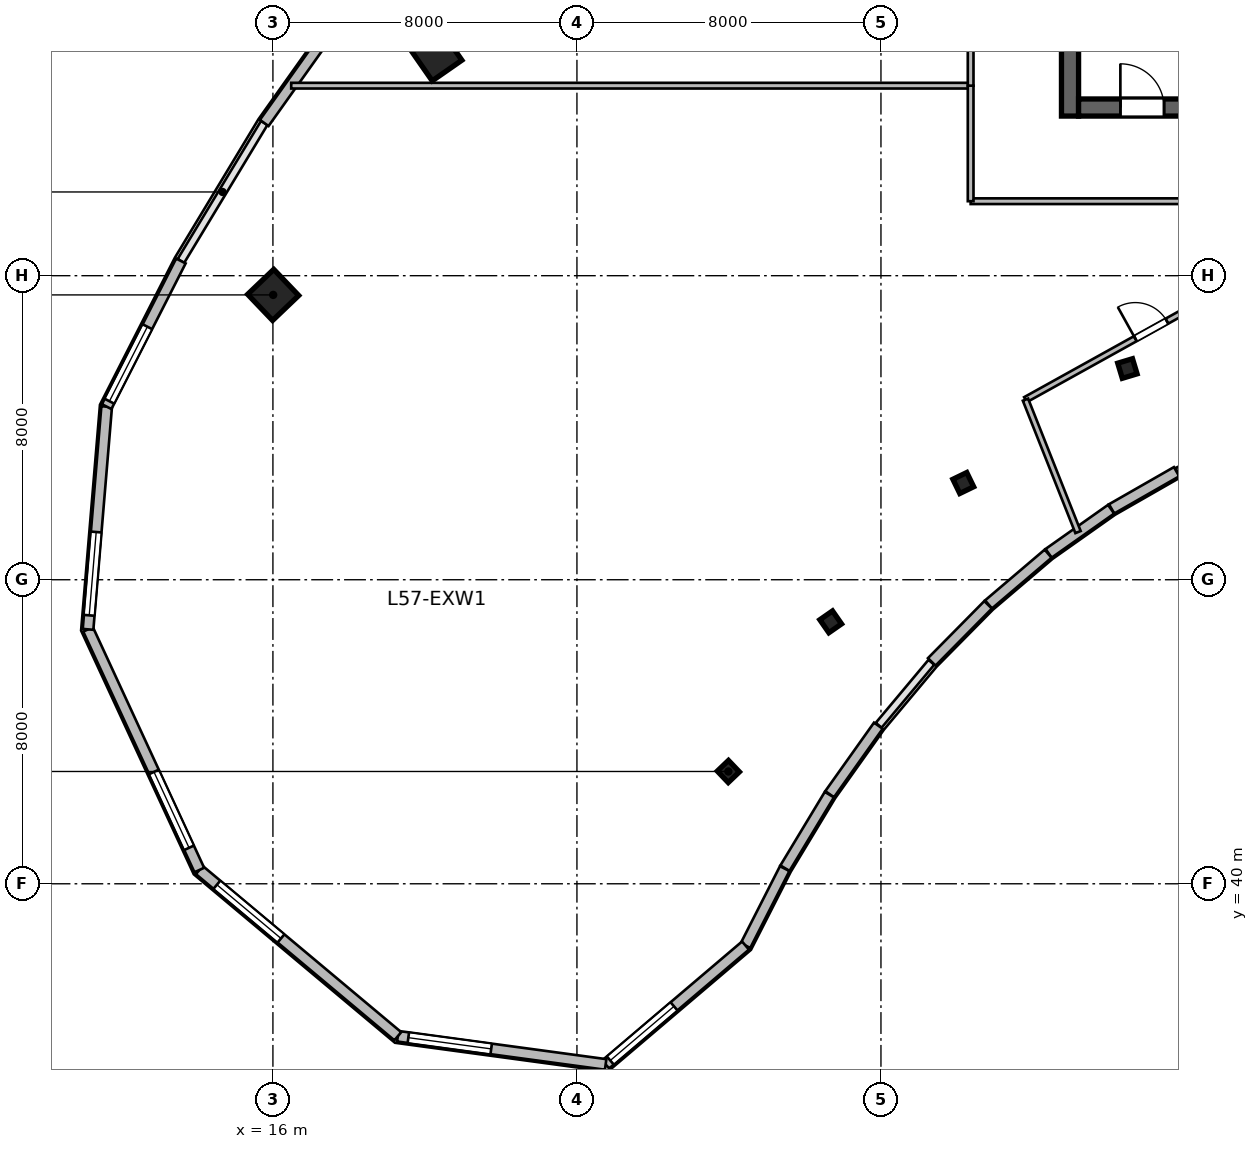
"""IFC4 building model, lengths in metres.
Left out: names, types, materials, properties, quantities, classifications, styles, units other than length and angle.
Written with IfcOpenShell. Run it as: python <this file> out.ifc"""

import sys

from ifc_helpers import new_model, si_unit, direction, frame, frame_2d, origin, origin_2d, place, context, subcontext, project, spatial, rectangle, i_section, extrude, source, transform, mapped, element, fill, save


model = new_model("IFC4")
c1 = context("Model", 3, precision=1e-05, world=origin(), true_north=direction((0.0, 1.0)))
c2 = subcontext(c1, "Body", "Model", "MODEL_VIEW")
j1 = project(units=[si_unit("LENGTHUNIT", "METRE"), si_unit("PLANEANGLEUNIT", "RADIAN")], contexts=[c1])
p1 = place(None, origin())
s1 = spatial("IfcSite", under=j1, at=p1, CompositionType="ELEMENT")
p2 = place(p1, origin())
s2 = spatial("IfcBuilding", under=s1, at=p2, CompositionType="ELEMENT")
p3 = place(p2, frame((0.0, 0.0, 235.2)))
s3 = spatial("IfcBuildingStorey", under=s2, at=p3, CompositionType="ELEMENT", Elevation=235.2)
m1 = source(origin(), c2, "Body", "SweptSolid", [
    extrude(rectangle(XDim=12.0, YDim=0.45, at=frame_2d((6.0, 0.0))), origin(), (0.0, 0.0, 1.0), 3.9),
])
p4 = place(p3, frame((36.975, 60.2, 0.0), z_axis=(0.0, 0.0, 1.0), x_axis=(0.0, 1.0, 0.0)))
e1 = element("IfcWall", 1, at=p4, inside=s3, PredefinedType="SHEAR", context=c2, shape_type="MappedRepresentation", body=[
    mapped(m1, transform((0.0, 0.0, 0.0), scale=1.0)),
])
m2 = source(origin(), c2, "Body", "SweptSolid", [
    extrude(rectangle(XDim=21.6, YDim=0.45, at=frame_2d((10.8, 0.0))), origin(), (0.0, 0.0, 1.0), 3.9),
])
p5 = place(p3, frame((37.2, 60.425, 0.0), z_axis=(0.0, 0.0, 1.0), x_axis=(1.0, 0.0, 0.0)))
e2 = element("IfcWall", 2, at=p5, inside=s3, PredefinedType="SHEAR", context=c2, shape_type="MappedRepresentation", body=[
    mapped(m2, transform((0.0, 0.0, 0.0), scale=1.0)),
])
p6 = place(p5, frame((1.1, 0.0, 0.0)))
e3 = element("IfcOpeningElement", 3, at=p6, cuts=e2, PredefinedType="OPENING", context=c2, shape_type="SweptSolid", body=[
    extrude(rectangle(XDim=1.15, YDim=2.15, at=frame_2d((0.575, 1.075))), frame((0.0, 0.235, 0.0), z_axis=(0.0, -1.0, 0.0), x_axis=(1.0, 0.0, 0.0)), (0.0, 0.0, 1.0), 0.47),
])
p7 = place(p5, frame((19.5, 0.0, 0.0)))
e4 = element("IfcOpeningElement", 4, at=p7, cuts=e2, PredefinedType="OPENING", context=c2, shape_type="SweptSolid", body=[
    extrude(rectangle(XDim=0.9, YDim=2.1, at=frame_2d((0.45, 1.05))), frame((0.0, 0.235, 0.0), z_axis=(0.0, -1.0, 0.0), x_axis=(1.0, 0.0, 0.0)), (0.0, 0.0, 1.0), 0.47),
])
p8 = place(p5, frame((12.02, 0.0, 0.0)))
e5 = element("IfcOpeningElement", 5, at=p8, cuts=e2, PredefinedType="OPENING", context=c2, shape_type="SweptSolid", body=[
    extrude(rectangle(XDim=1.6, YDim=2.15, at=frame_2d((0.8, 1.075))), frame((0.0, 0.235, 0.0), z_axis=(0.0, -1.0, 0.0), x_axis=(1.0, 0.0, 0.0)), (0.0, 0.0, 1.0), 0.47),
])
m3 = source(origin(), c2, "Body", "SweptSolid", [
    extrude(i_section(OverallWidth=0.406, OverallDepth=0.416, WebThickness=0.03, FlangeThickness=0.048, at=origin_2d()), origin(), (0.0, 0.0, 1.0), 3.9),
])
p9 = place(p3, frame((27.985, 42.955, 0.0), z_axis=(0.0, 0.0, 1.0), x_axis=(-0.690756218984, 0.723087716626, 0.0)))
e6 = element("IfcColumn", 6, at=p9, inside=s3, PredefinedType="COLUMN", context=c2, shape_type="MappedRepresentation", body=[
    mapped(m3, transform((0.0, 0.0, 0.0), scale=1.0)),
])
m4 = source(origin(), c2, "Body", "SweptSolid", [
    extrude(rectangle(XDim=0.95, YDim=0.95, at=origin_2d()), origin(), (0.0, 0.0, 1.0), 3.9),
])
p10 = place(p3, frame((16.007, 55.494, 0.0), z_axis=(0.0, 0.0, 1.0), x_axis=(-0.690756218984, 0.723087716626, 0.0)))
e7 = element("IfcColumn", 7, at=p10, inside=s3, PredefinedType="COLUMN", context=c2, shape_type="MappedRepresentation", body=[
    mapped(m4, transform((0.0, 0.0, 0.0), scale=1.0)),
])
p11 = place(p3, frame((30.677, 46.892, 0.0), z_axis=(0.0, 0.0, 1.0), x_axis=(-0.571143442153, 0.820850271661, 0.0)))
e8 = element("IfcColumn", 8, at=p11, inside=s3, PredefinedType="COLUMN", context=c2, shape_type="MappedRepresentation", body=[
    mapped(m3, transform((0.0, 0.0, 0.0), scale=1.0)),
])
p12 = place(p3, frame((20.311, 61.789, 0.0), z_axis=(0.0, 0.0, 1.0), x_axis=(-0.571143442153, 0.820850271661, 0.0)))
e9 = element("IfcColumn", 9, at=p12, inside=s3, PredefinedType="COLUMN", context=c2, shape_type="MappedRepresentation", body=[
    mapped(m4, transform((0.0, 0.0, 0.0), scale=1.0)),
])
for number, where, z_axis, x_axis in (
    (10, (34.166, 50.545, 0.0), (0.0, 0.0, 1.0), (-0.436, 0.9, 0.0)),
    (11, (38.485, 53.558, 0.0), (0.0, 0.0, 1.0), (-0.289, 0.957, 0.0)),
):
    element("IfcColumn", number, at=place(p3, frame(where, z_axis=z_axis, x_axis=x_axis)), inside=s3, PredefinedType="COLUMN", context=c2, shape_type="MappedRepresentation", body=[
        mapped(m3, transform((0.0, 0.0, 0.0), scale=1.0)),
    ])
m5 = source(origin(), c2, "Body", "SweptSolid", [
    extrude(rectangle(XDim=1.969, YDim=0.28, at=frame_2d((0.984, 0.0))), origin(), (0.0, 0.0, 1.0), 3.65),
])
p13 = place(p3, frame((39.779, 50.842, 0.0), z_axis=(0.0, 0.0, 1.0), x_axis=(-0.86797594681, -0.496606238139, 0.0)))
e12 = element("IfcWall", 12, at=p13, inside=s3, PredefinedType="SOLIDWALL", context=c2, shape_type="MappedRepresentation", body=[
    mapped(m5, transform((0.0, 0.0, 0.0), scale=1.0)),
])
m6 = source(origin(), c2, "Body", "SweptSolid", [
    extrude(rectangle(XDim=2.012, YDim=0.28, at=frame_2d((1.006, 0.0))), origin(), (0.0, 0.0, 1.0), 3.65),
])
p14 = place(p3, frame((38.055, 49.855, 0.0), z_axis=(0.0, 0.0, 1.0), x_axis=(-0.817008215805, -0.576626027255, 0.0)))
e13 = element("IfcWall", 13, at=p14, inside=s3, PredefinedType="SOLIDWALL", context=c2, shape_type="MappedRepresentation", body=[
    mapped(m6, transform((0.0, 0.0, 0.0), scale=1.0)),
])
m7 = source(origin(), c2, "Body", "SweptSolid", [
    extrude(rectangle(XDim=2.06, YDim=0.28, at=frame_2d((1.03, 0.0))), origin(), (0.0, 0.0, 1.0), 3.65),
])
p15 = place(p3, frame((36.399, 48.685, 0.0), z_axis=(0.0, 0.0, 1.0), x_axis=(-0.761494573969, -0.648171284319, 0.0)))
e14 = element("IfcWall", 14, at=p15, inside=s3, PredefinedType="SOLIDWALL", context=c2, shape_type="MappedRepresentation", body=[
    mapped(m7, transform((0.0, 0.0, 0.0), scale=1.0)),
])
m8 = source(origin(), c2, "Body", "SweptSolid", [
    extrude(rectangle(XDim=2.11, YDim=0.28, at=frame_2d((1.055, 0.0))), origin(), (0.0, 0.0, 1.0), 3.65),
])
p16 = place(p3, frame((34.819, 47.34, 0.0), z_axis=(0.0, 0.0, 1.0), x_axis=(-0.702695473125, -0.711490739258, 0.0)))
e15 = element("IfcWall", 15, at=p16, inside=s3, PredefinedType="SOLIDWALL", context=c2, shape_type="MappedRepresentation", body=[
    mapped(m8, transform((0.0, 0.0, 0.0), scale=1.0)),
])
m9 = source(origin(), c2, "Body", "SweptSolid", [
    extrude(rectangle(XDim=2.212, YDim=0.28, at=frame_2d((1.106, 0.0))), origin(), (0.0, 0.0, 1.0), 3.65),
])
p17 = place(p3, frame((31.931, 44.159, 0.0), z_axis=(0.0, 0.0, 1.0), x_axis=(-0.579639452819, -0.814873060504, 0.0)))
e16 = element("IfcWall", 16, at=p17, inside=s3, PredefinedType="SOLIDWALL", context=c2, shape_type="MappedRepresentation", body=[
    mapped(m9, transform((0.0, 0.0, 0.0), scale=1.0)),
])
m10 = source(origin(), c2, "Body", "SweptSolid", [
    extrude(rectangle(XDim=2.261, YDim=0.28, at=frame_2d((1.13, 0.0))), origin(), (0.0, 0.0, 1.0), 3.65),
])
p18 = place(p3, frame((30.642, 42.346, 0.0), z_axis=(0.0, 0.0, 1.0), x_axis=(-0.516891494538, -0.856050923062, 0.0)))
e17 = element("IfcWall", 17, at=p18, inside=s3, PredefinedType="SOLIDWALL", context=c2, shape_type="MappedRepresentation", body=[
    mapped(m10, transform((0.0, 0.0, 0.0), scale=1.0)),
])
m11 = source(origin(), c2, "Body", "SweptSolid", [
    extrude(rectangle(XDim=2.271, YDim=0.28, at=frame_2d((1.136, 0.0))), origin(), (0.0, 0.0, 1.0), 3.65),
])
p19 = place(p3, frame((29.467, 40.399, 0.0), z_axis=(0.0, 0.0, 1.0), x_axis=(-0.453993402883, -0.891005044957, 0.0)))
e18 = element("IfcWall", 18, at=p19, inside=s3, PredefinedType="SOLIDWALL", context=c2, shape_type="MappedRepresentation", body=[
    mapped(m11, transform((0.0, 0.0, 0.0), scale=1.0)),
])
m12 = source(origin(), c2, "Body", "SweptSolid", [
    extrude(rectangle(XDim=4.83, YDim=0.28, at=frame_2d((2.415, 0.0))), origin(), (0.0, 0.0, 1.0), 3.65),
])
p20 = place(p3, frame((28.436, 38.375, 0.0), z_axis=(0.0, 0.0, 1.0), x_axis=(-0.761890676316, -0.647705640968, 0.0)))
e19 = element("IfcWall", 19, at=p20, inside=s3, PredefinedType="SOLIDWALL", context=c2, shape_type="MappedRepresentation", body=[
    mapped(m12, transform((0.0, 0.0, 0.0), scale=1.0)),
])
p21 = place(p20, frame((2.47, 0.0, 0.95)))
e20 = element("IfcOpeningElement", 20, at=p21, cuts=e19, PredefinedType="OPENING", context=c2, shape_type="SweptSolid", body=[
    extrude(rectangle(XDim=2.2, YDim=2.1, at=frame_2d((1.1, 1.05))), frame((0.0, 0.15, 0.0), z_axis=(0.0, -1.0, 0.0), x_axis=(1.0, 0.0, 0.0)), (0.0, 0.0, 1.0), 0.3),
])
m13 = source(origin(), c2, "Body", "SweptSolid", [
    extrude(rectangle(XDim=5.52, YDim=0.28, at=frame_2d((2.76, 0.0))), origin(), (0.0, 0.0, 1.0), 3.65),
])
p22 = place(p3, frame((24.756, 35.247, 0.0), z_axis=(0.0, 0.0, 1.0), x_axis=(-0.99093029136, 0.134376923856, 0.0)))
e21 = element("IfcWall", 21, at=p22, inside=s3, PredefinedType="SOLIDWALL", context=c2, shape_type="MappedRepresentation", body=[
    mapped(m13, transform((0.0, 0.0, 0.0), scale=1.0)),
])
p23 = place(p22, frame((3.04, 0.0, 0.95)))
e22 = element("IfcOpeningElement", 22, at=p23, cuts=e21, PredefinedType="OPENING", context=c2, shape_type="SweptSolid", body=[
    extrude(rectangle(XDim=2.2, YDim=2.1, at=frame_2d((1.1, 1.05))), frame((0.0, 0.15, 0.0), z_axis=(0.0, -1.0, 0.0), x_axis=(1.0, 0.0, 0.0)), (0.0, 0.0, 1.0), 0.3),
])
m14 = source(origin(), c2, "Body", "SweptSolid", [
    extrude(rectangle(XDim=6.812, YDim=0.28, at=frame_2d((3.406, 0.0))), origin(), (0.0, 0.0, 1.0), 3.65),
])
p24 = place(p3, frame((19.286, 35.988, 0.0), z_axis=(0.0, 0.0, 1.0), x_axis=(-0.766712133953, 0.641991046394, 0.0)))
e23 = element("IfcWall", 23, at=p24, inside=s3, PredefinedType="SOLIDWALL", context=c2, shape_type="MappedRepresentation", body=[
    mapped(m14, transform((0.0, 0.0, 0.0), scale=1.0)),
])
p25 = place(p24, frame((4.009, 0.0, 0.95)))
e24 = element("IfcOpeningElement", 24, at=p25, cuts=e23, PredefinedType="OPENING", context=c2, shape_type="SweptSolid", body=[
    extrude(rectangle(XDim=2.2, YDim=2.1, at=frame_2d((1.1, 1.05))), frame((0.0, 0.15, 0.0), z_axis=(0.0, -1.0, 0.0), x_axis=(1.0, 0.0, 0.0)), (0.0, 0.0, 1.0), 0.3),
])
m15 = source(origin(), c2, "Body", "SweptSolid", [
    extrude(rectangle(XDim=6.977, YDim=0.28, at=frame_2d((3.488, 0.0))), origin(), (0.0, 0.0, 1.0), 3.65),
])
p26 = place(p3, frame((14.063, 40.362, 0.0), z_axis=(0.0, 0.0, 1.0), x_axis=(-0.41966832263, 0.907677530283, 0.0)))
e25 = element("IfcWall", 25, at=p26, inside=s3, PredefinedType="SOLIDWALL", context=c2, shape_type="MappedRepresentation", body=[
    mapped(m15, transform((0.0, 0.0, 0.0), scale=1.0)),
])
p27 = place(p26, frame((0.644, 0.0, 0.95)))
e26 = element("IfcOpeningElement", 26, at=p27, cuts=e25, PredefinedType="OPENING", context=c2, shape_type="SweptSolid", body=[
    extrude(rectangle(XDim=2.2, YDim=2.1, at=frame_2d((1.1, 1.05))), frame((0.0, 0.15, 0.0), z_axis=(0.0, -1.0, 0.0), x_axis=(1.0, 0.0, 0.0)), (0.0, 0.0, 1.0), 0.3),
])
m16 = source(origin(), c2, "Body", "SweptSolid", [
    extrude(rectangle(XDim=5.881, YDim=0.28, at=frame_2d((2.94, 0.0))), origin(), (0.0, 0.0, 1.0), 3.65),
])
p28 = place(p3, frame((11.135, 46.694, 0.0), z_axis=(0.0, 0.0, 1.0), x_axis=(0.083320333731, 0.996522815588, 0.0)))
e27 = element("IfcWall", 27, at=p28, inside=s3, PredefinedType="SOLIDWALL", context=c2, shape_type="MappedRepresentation", body=[
    mapped(m16, transform((0.0, 0.0, 0.0), scale=1.0)),
])
p29 = place(p28, frame((0.37, 0.0, 0.95)))
e28 = element("IfcOpeningElement", 28, at=p29, cuts=e27, PredefinedType="OPENING", context=c2, shape_type="SweptSolid", body=[
    extrude(rectangle(XDim=2.2, YDim=2.1, at=frame_2d((1.1, 1.05))), frame((0.0, 0.15, 0.0), z_axis=(0.0, -1.0, 0.0), x_axis=(1.0, 0.0, 0.0)), (0.0, 0.0, 1.0), 0.3),
])
m17 = source(origin(), c2, "Body", "SweptSolid", [
    extrude(rectangle(XDim=4.301, YDim=0.28, at=frame_2d((2.151, 0.0))), origin(), (0.0, 0.0, 1.0), 3.65),
])
p30 = place(p3, frame((11.625, 52.555, 0.0), z_axis=(0.0, 0.0, 1.0), x_axis=(0.454011655096, 0.89099574468, 0.0)))
e29 = element("IfcWall", 29, at=p30, inside=s3, PredefinedType="SOLIDWALL", context=c2, shape_type="MappedRepresentation", body=[
    mapped(m17, transform((0.0, 0.0, 0.0), scale=1.0)),
])
p31 = place(p30, frame((0.16, 0.0, 0.95)))
e30 = element("IfcOpeningElement", 30, at=p31, cuts=e29, PredefinedType="OPENING", context=c2, shape_type="SweptSolid", body=[
    extrude(rectangle(XDim=2.2, YDim=2.1, at=frame_2d((1.1, 1.05))), frame((0.0, 0.15, 0.0), z_axis=(0.0, -1.0, 0.0), x_axis=(1.0, 0.0, 0.0)), (0.0, 0.0, 1.0), 0.3),
])
m18 = source(origin(), c2, "Body", "SweptSolid", [
    extrude(rectangle(XDim=4.149, YDim=0.28, at=frame_2d((2.074, 0.0))), origin(), (0.0, 0.0, 1.0), 3.65),
])
p32 = place(p3, frame((15.771, 60.019, 0.0), z_axis=(0.0, 0.0, 1.0), x_axis=(0.579622789827, 0.814884913048, 0.0)))
e31 = element("IfcWall", 31, at=p32, inside=s3, PredefinedType="SOLIDWALL", context=c2, shape_type="MappedRepresentation", body=[
    mapped(m18, transform((0.0, 0.0, 0.0), scale=1.0)),
])
m19 = source(origin(), c2, "Body", "SweptSolid", [
    extrude(rectangle(XDim=5.262, YDim=0.15, at=frame_2d((2.631, 0.0))), origin(), (0.0, 0.0, 1.0), 3.65),
])
p33 = place(p3, frame((35.803, 52.738, 0.0), z_axis=(0.0, 0.0, 1.0), x_axis=(0.874365088288, 0.485268680612, 0.0)))
e32 = element("IfcWall", 32, at=p33, inside=s3, PredefinedType="PARTITIONING", context=c2, shape_type="MappedRepresentation", body=[
    mapped(m19, transform((0.0, 0.0, 0.0), scale=1.0)),
])
p34 = place(p33, frame((3.306, 0.0, 0.0)))
e33 = element("IfcOpeningElement", 33, at=p34, cuts=e32, PredefinedType="OPENING", context=c2, shape_type="SweptSolid", body=[
    extrude(rectangle(XDim=0.95, YDim=2.1, at=frame_2d((0.475, 1.05))), frame((0.0, 0.085, 0.0), z_axis=(0.0, -1.0, 0.0), x_axis=(1.0, 0.0, 0.0)), (0.0, 0.0, 1.0), 0.17),
])
m20 = source(origin(), c2, "Body", "SweptSolid", [
    extrude(rectangle(XDim=3.749, YDim=0.15, at=frame_2d((1.875, 0.0))), origin(), (0.0, 0.0, 1.0), 3.65),
])
p35 = place(p3, frame((37.186, 49.254, 0.0), z_axis=(0.0, 0.0, 1.0), x_axis=(-0.368851771682, 0.92948823044, 0.0)))
e34 = element("IfcWall", 34, at=p35, inside=s3, PredefinedType="PARTITIONING", context=c2, shape_type="MappedRepresentation", body=[
    mapped(m20, transform((0.0, 0.0, 0.0), scale=1.0)),
])
m21 = source(origin(), c2, "Body", "SweptSolid", [
    extrude(rectangle(XDim=12.39, YDim=0.15, at=frame_2d((6.195, 0.0))), origin(), (0.0, 0.0, 1.0), 3.65),
])
p36 = place(p3, frame((34.36, 57.96, 0.0), z_axis=(0.0, 0.0, 1.0), x_axis=(1.0, 0.0, 0.0)))
e35 = element("IfcWall", 35, at=p36, inside=s3, PredefinedType="PARTITIONING", context=c2, shape_type="MappedRepresentation", body=[
    mapped(m21, transform((0.0, 0.0, 0.0), scale=1.0)),
])
m22 = source(origin(), c2, "Body", "SweptSolid", [
    extrude(rectangle(XDim=17.879, YDim=0.15, at=frame_2d((8.939, 0.0))), origin(), (0.0, 0.0, 1.0), 3.65),
])
p37 = place(p3, frame((16.481, 61.0, 0.0), z_axis=(0.0, 0.0, 1.0), x_axis=(1.0, 0.0, 0.0)))
e36 = element("IfcWall", 36, at=p37, inside=s3, PredefinedType="PARTITIONING", context=c2, shape_type="MappedRepresentation", body=[
    mapped(m22, transform((0.0, 0.0, 0.0), scale=1.0)),
])
m23 = source(origin(), c2, "Body", "SweptSolid", [
    extrude(rectangle(XDim=3.04, YDim=0.15, at=frame_2d((1.52, 0.0))), origin(), (0.0, 0.0, 1.0), 3.65),
])
p38 = place(p3, frame((34.36, 57.96, 0.0), z_axis=(0.0, 0.0, 1.0), x_axis=(0.0, 1.0, 0.0)))
e37 = element("IfcWall", 37, at=p38, inside=s3, PredefinedType="PARTITIONING", context=c2, shape_type="MappedRepresentation", body=[
    mapped(m23, transform((0.0, 0.0, 0.0), scale=1.0)),
])
m24 = source(origin(), c2, "Body", "SweptSolid", [
    extrude(rectangle(XDim=3.2, YDim=0.15, at=frame_2d((1.6, 0.0))), origin(), (0.0, 0.0, 1.0), 3.65),
])
p39 = place(p3, frame((34.36, 61.0, 0.0), z_axis=(0.0, 0.0, 1.0), x_axis=(0.0, 1.0, 0.0)))
e38 = element("IfcWall", 38, at=p39, inside=s3, PredefinedType="PARTITIONING", context=c2, shape_type="MappedRepresentation", body=[
    mapped(m24, transform((0.0, 0.0, 0.0), scale=1.0)),
])
p40 = place(p39, frame((1.125, 0.0, 0.0)))
e39 = element("IfcOpeningElement", 39, at=p40, cuts=e38, PredefinedType="OPENING", context=c2, shape_type="SweptSolid", body=[
    extrude(rectangle(XDim=0.95, YDim=2.1, at=frame_2d((0.475, 1.05))), frame((0.0, 0.085, 0.0), z_axis=(0.0, -1.0, 0.0), x_axis=(1.0, 0.0, 0.0)), (0.0, 0.0, 1.0), 0.17),
])
m25 = source(origin(), c2, "Body", "SweptSolid", [
    extrude(rectangle(XDim=2.2, YDim=2.1, at=frame_2d((1.1, 1.05))), frame((0.0, 0.03, 0.0), z_axis=(0.0, -1.0, 0.0), x_axis=(1.0, 0.0, 0.0)), (0.0, 0.0, 1.0), 0.06),
])
p41 = place(p21, origin())
e40 = element("IfcWindow", 40, at=p41, inside=s3, PartitioningType="TRIPLE_PANEL_VERTICAL", PredefinedType="WINDOW", context=c2, shape_type="MappedRepresentation", body=[
    mapped(m25, transform((0.0, 0.0, 0.0), scale=1.0)),
])
fill(e20, e40)
p42 = place(p23, origin())
e41 = element("IfcWindow", 41, at=p42, inside=s3, PartitioningType="TRIPLE_PANEL_VERTICAL", PredefinedType="WINDOW", context=c2, shape_type="MappedRepresentation", body=[
    mapped(m25, transform((0.0, 0.0, 0.0), scale=1.0)),
])
fill(e22, e41)
p43 = place(p25, origin())
e42 = element("IfcWindow", 42, at=p43, inside=s3, PartitioningType="TRIPLE_PANEL_VERTICAL", PredefinedType="WINDOW", context=c2, shape_type="MappedRepresentation", body=[
    mapped(m25, transform((0.0, 0.0, 0.0), scale=1.0)),
])
fill(e24, e42)
p44 = place(p27, origin())
e43 = element("IfcWindow", 43, at=p44, inside=s3, PartitioningType="TRIPLE_PANEL_VERTICAL", PredefinedType="WINDOW", context=c2, shape_type="MappedRepresentation", body=[
    mapped(m25, transform((0.0, 0.0, 0.0), scale=1.0)),
])
fill(e26, e43)
p45 = place(p29, origin())
e44 = element("IfcWindow", 44, at=p45, inside=s3, PartitioningType="TRIPLE_PANEL_VERTICAL", PredefinedType="WINDOW", context=c2, shape_type="MappedRepresentation", body=[
    mapped(m25, transform((0.0, 0.0, 0.0), scale=1.0)),
])
fill(e28, e44)
p46 = place(p31, origin())
e45 = element("IfcWindow", 45, at=p46, inside=s3, PartitioningType="TRIPLE_PANEL_VERTICAL", PredefinedType="WINDOW", context=c2, shape_type="MappedRepresentation", body=[
    mapped(m25, transform((0.0, 0.0, 0.0), scale=1.0)),
])
fill(e30, e45)
m26 = source(origin(), c2, "Body", "SweptSolid", [
    extrude(rectangle(XDim=1.15, YDim=2.15, at=frame_2d((0.575, 1.075))), frame((0.0, 0.025, 0.0), z_axis=(0.0, -1.0, 0.0), x_axis=(1.0, 0.0, 0.0)), (0.0, 0.0, 1.0), 0.05),
])
p47 = place(p6, origin())
e46 = element("IfcDoor", 46, at=p47, inside=s3, OperationType="SINGLE_SWING_LEFT", PredefinedType="DOOR", context=c2, shape_type="MappedRepresentation", body=[
    mapped(m26, transform((0.0, 0.0, 0.0), scale=1.0)),
])
fill(e3, e46)
m27 = source(origin(), c2, "Body", "SweptSolid", [
    extrude(rectangle(XDim=0.95, YDim=2.1, at=frame_2d((0.475, 1.05))), frame((0.0, 0.025, 0.0), z_axis=(0.0, -1.0, 0.0), x_axis=(1.0, 0.0, 0.0)), (0.0, 0.0, 1.0), 0.05),
])
p48 = place(p34, origin())
e47 = element("IfcDoor", 47, at=p48, inside=s3, OperationType="SINGLE_SWING_LEFT", PredefinedType="DOOR", context=c2, shape_type="MappedRepresentation", body=[
    mapped(m27, transform((0.0, 0.0, 0.0), scale=1.0)),
])
fill(e33, e47)
save(model, sys.argv[1])
